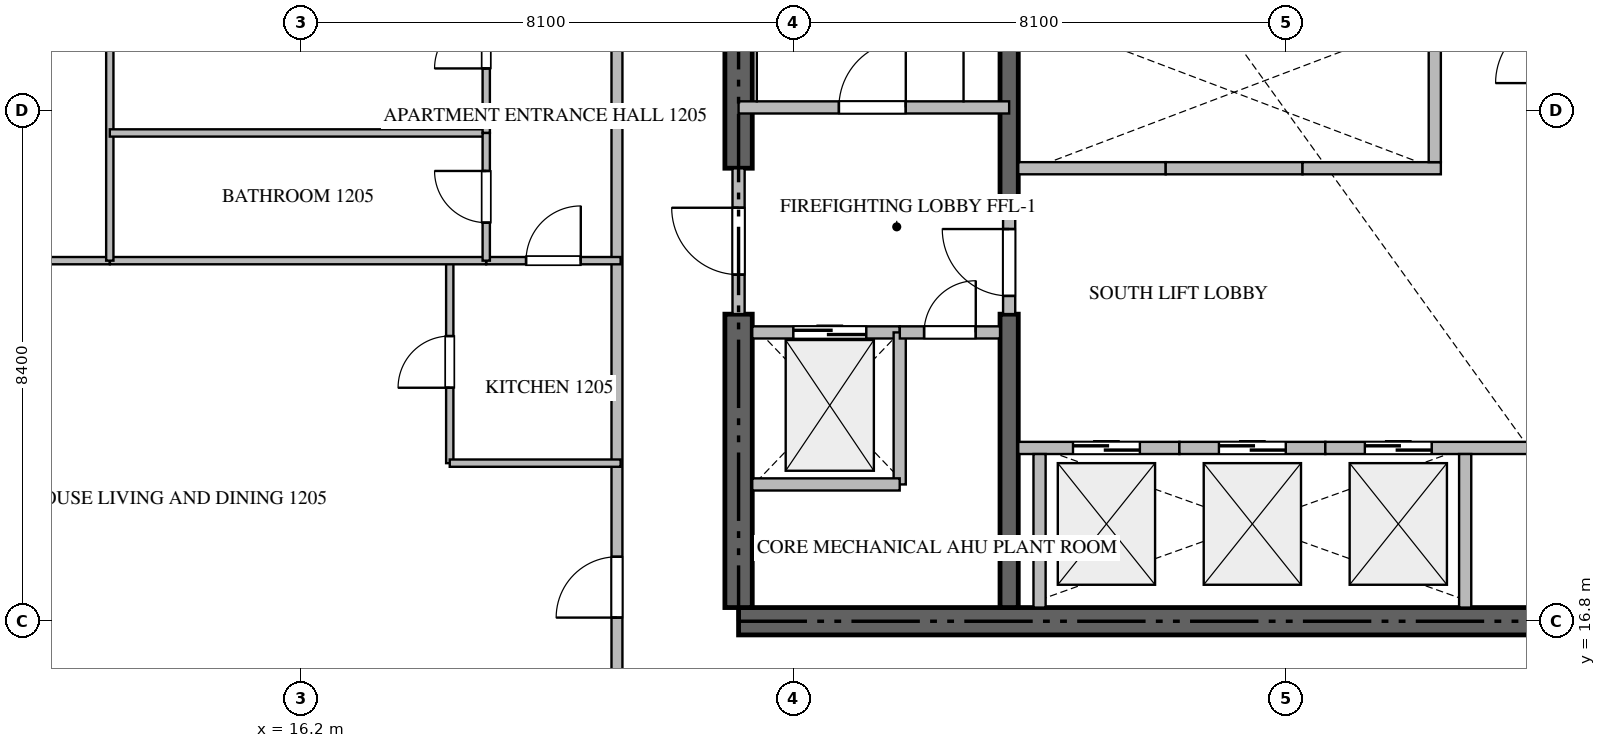
"""IFC4 building model, lengths in metres.
Left out: names, types, materials, properties, quantities, classifications, styles, units other than length and angle.
Written with IfcOpenShell. Run it as: python <this file> out.ifc"""

import sys

from ifc_helpers import new_model, si_unit, direction, frame, frame_2d, origin, place, context, subcontext, project, spatial, rectangle, extrude, source, transform, mapped, element, fill, save


model = new_model("IFC4")
c1 = context("Model", 3, precision=1e-05, world=origin(), true_north=direction((0.0, 1.0)))
c2 = subcontext(c1, "Body", "Model", "MODEL_VIEW")
j1 = project(units=[si_unit("LENGTHUNIT", "METRE"), si_unit("PLANEANGLEUNIT", "RADIAN")], contexts=[c1])
p1 = place(None, origin())
s1 = spatial("IfcSite", under=j1, at=p1, CompositionType="ELEMENT")
p2 = place(p1, origin())
s2 = spatial("IfcBuilding", under=s1, at=p2, CompositionType="ELEMENT")
p3 = place(p2, frame((0.0, 0.0, 52.95)))
s3 = spatial("IfcBuildingStorey", under=s2, at=p3, CompositionType="ELEMENT", Elevation=52.95)
p4 = place(p3, frame((23.4, 16.8, -0.26), z_axis=(0.0, 0.0, 1.0), x_axis=(1.0, 0.0, 0.0)))
e1 = element("IfcWall", 1, at=p4, inside=s3, PredefinedType="SHEAR", context=c2, shape_type="SweptSolid", body=[
    extrude(rectangle(XDim=18.0, YDim=0.45, at=frame_2d((9.0, 0.0))), origin(), (0.0, 0.0, 1.0), 3.748),
])
p5 = place(p3, frame((23.4, 17.025, -0.26), z_axis=(0.0, 0.0, 1.0), x_axis=(0.0, 1.0, 0.0)))
e2 = element("IfcWall", 2, at=p5, inside=s3, PredefinedType="SHEAR", context=c2, shape_type="SweptSolid", body=[
    extrude(rectangle(XDim=4.825, YDim=0.45, at=frame_2d((2.413, 0.0))), origin(), (0.0, 0.0, 1.0), 3.748),
])
p6 = place(p3, frame((23.4, 24.25, -0.26), z_axis=(0.0, 0.0, 1.0), x_axis=(0.0, 1.0, 0.0)))
e3 = element("IfcWall", 3, at=p6, inside=s3, PredefinedType="SHEAR", context=c2, shape_type="SweptSolid", body=[
    extrude(rectangle(XDim=9.125, YDim=0.45, at=frame_2d((4.562, 0.0))), origin(), (0.0, 0.0, 1.0), 3.748),
])
p7 = place(p3, frame((27.85, 17.025, -0.26), z_axis=(0.0, 0.0, 1.0), x_axis=(0.0, 1.0, 0.0)))
e4 = element("IfcWall", 4, at=p7, inside=s3, PredefinedType="SHEAR", context=c2, shape_type="SweptSolid", body=[
    extrude(rectangle(XDim=4.825, YDim=0.3, at=frame_2d((2.413, 0.0))), origin(), (0.0, 0.0, 1.0), 3.748),
])
p8 = place(p3, frame((27.85, 23.55, -0.26), z_axis=(0.0, 0.0, 1.0), x_axis=(0.0, 1.0, 0.0)))
e5 = element("IfcWall", 5, at=p8, inside=s3, PredefinedType="SHEAR", context=c2, shape_type="SweptSolid", body=[
    extrude(rectangle(XDim=9.825, YDim=0.3, at=frame_2d((4.913, 0.0))), origin(), (0.0, 0.0, 1.0), 3.748),
])
p9 = place(p3, frame((23.4, 25.25, 0.0), z_axis=(0.0, 0.0, 1.0), x_axis=(1.0, 0.0, 0.0)))
e6 = element("IfcWall", 6, at=p9, inside=s3, PredefinedType="STANDARD", context=c2, shape_type="SweptSolid", body=[
    extrude(rectangle(XDim=4.45, YDim=0.2, at=frame_2d((2.225, 0.0))), origin(), (0.0, 0.0, 1.0), 3.49),
])
p10 = place(p9, frame((1.65, 0.0, 0.0)))
e7 = element("IfcOpeningElement", 7, at=p10, cuts=e6, PredefinedType="OPENING", context=c2, shape_type="SweptSolid", body=[
    extrude(rectangle(XDim=1.1, YDim=2.15, at=frame_2d((0.55, 1.075))), frame((0.0, 0.11, 0.0), z_axis=(0.0, -1.0, 0.0), x_axis=(1.0, 0.0, 0.0)), (0.0, 0.0, 1.0), 0.22),
])
p11 = place(p3, frame((23.625, 21.55, 0.0), z_axis=(0.0, 0.0, 1.0), x_axis=(1.0, 0.0, 0.0)))
e8 = element("IfcWall", 8, at=p11, inside=s3, PredefinedType="STANDARD", context=c2, shape_type="SweptSolid", body=[
    extrude(rectangle(XDim=2.425, YDim=0.2, at=frame_2d((1.212, 0.0))), origin(), (0.0, 0.0, 1.0), 3.49),
])
p12 = place(p11, frame((0.675, 0.0, 0.0)))
e9 = element("IfcOpeningElement", 9, at=p12, cuts=e8, PredefinedType="OPENING", context=c2, shape_type="SweptSolid", body=[
    extrude(rectangle(XDim=1.2, YDim=2.2, at=frame_2d((0.6, 1.1))), frame((0.0, 0.11, 0.0), z_axis=(0.0, -1.0, 0.0), x_axis=(1.0, 0.0, 0.0)), (0.0, 0.0, 1.0), 0.22),
])
p13 = place(p3, frame((28.0, 19.65, 0.0), z_axis=(0.0, 0.0, 1.0), x_axis=(1.0, 0.0, 0.0)))
e10 = element("IfcWall", 10, at=p13, inside=s3, PredefinedType="STANDARD", context=c2, shape_type="SweptSolid", body=[
    extrude(rectangle(XDim=2.65, YDim=0.2, at=frame_2d((1.325, 0.0))), origin(), (0.0, 0.0, 1.0), 3.49),
])
p14 = place(p13, frame((0.9, 0.0, 0.0)))
e11 = element("IfcOpeningElement", 11, at=p14, cuts=e10, PredefinedType="OPENING", context=c2, shape_type="SweptSolid", body=[
    extrude(rectangle(XDim=1.1, YDim=2.2, at=frame_2d((0.55, 1.1))), frame((0.0, 0.11, 0.0), z_axis=(0.0, -1.0, 0.0), x_axis=(1.0, 0.0, 0.0)), (0.0, 0.0, 1.0), 0.22),
])
p15 = place(p3, frame((28.35, 17.025, 0.0), z_axis=(0.0, 0.0, 1.0), x_axis=(0.0, 1.0, 0.0)))
e12 = element("IfcWall", 12, at=p15, inside=s3, PredefinedType="STANDARD", context=c2, shape_type="SweptSolid", body=[
    extrude(rectangle(XDim=2.525, YDim=0.2, at=frame_2d((1.263, 0.0))), origin(), (0.0, 0.0, 1.0), 3.49),
])
p16 = place(p3, frame((30.65, 19.65, 0.0), z_axis=(0.0, 0.0, 1.0), x_axis=(1.0, 0.0, 0.0)))
e13 = element("IfcWall", 13, at=p16, inside=s3, PredefinedType="STANDARD", context=c2, shape_type="SweptSolid", body=[
    extrude(rectangle(XDim=2.4, YDim=0.2, at=frame_2d((1.2, 0.0))), origin(), (0.0, 0.0, 1.0), 3.49),
])
p17 = place(p16, frame((0.65, 0.0, 0.0)))
e14 = element("IfcOpeningElement", 14, at=p17, cuts=e13, PredefinedType="OPENING", context=c2, shape_type="SweptSolid", body=[
    extrude(rectangle(XDim=1.1, YDim=2.2, at=frame_2d((0.55, 1.1))), frame((0.0, 0.11, 0.0), z_axis=(0.0, -1.0, 0.0), x_axis=(1.0, 0.0, 0.0)), (0.0, 0.0, 1.0), 0.22),
])
p18 = place(p3, frame((33.05, 19.65, 0.0), z_axis=(0.0, 0.0, 1.0), x_axis=(1.0, 0.0, 0.0)))
e15 = element("IfcWall", 15, at=p18, inside=s3, PredefinedType="STANDARD", context=c2, shape_type="SweptSolid", body=[
    extrude(rectangle(XDim=3.75, YDim=0.2, at=frame_2d((1.875, 0.0))), origin(), (0.0, 0.0, 1.0), 3.49),
])
p19 = place(p18, frame((0.65, 0.0, 0.0)))
e16 = element("IfcOpeningElement", 16, at=p19, cuts=e15, PredefinedType="OPENING", context=c2, shape_type="SweptSolid", body=[
    extrude(rectangle(XDim=1.1, YDim=2.2, at=frame_2d((0.55, 1.1))), frame((0.0, 0.11, 0.0), z_axis=(0.0, -1.0, 0.0), x_axis=(1.0, 0.0, 0.0)), (0.0, 0.0, 1.0), 0.22),
])
p20 = place(p3, frame((35.35, 17.025, 0.0), z_axis=(0.0, 0.0, 1.0), x_axis=(0.0, 1.0, 0.0)))
e17 = element("IfcWall", 17, at=p20, inside=s3, PredefinedType="STANDARD", context=c2, shape_type="SweptSolid", body=[
    extrude(rectangle(XDim=2.525, YDim=0.2, at=frame_2d((1.263, 0.0))), origin(), (0.0, 0.0, 1.0), 3.49),
])
p21 = place(p3, frame((28.0, 24.25, 0.0), z_axis=(0.0, 0.0, 1.0), x_axis=(1.0, 0.0, 0.0)))
e18 = element("IfcWall", 18, at=p21, inside=s3, PredefinedType="STANDARD", context=c2, shape_type="SweptSolid", body=[
    extrude(rectangle(XDim=2.425, YDim=0.2, at=frame_2d((1.212, 0.0))), origin(), (0.0, 0.0, 1.0), 3.49),
])
p22 = place(p3, frame((30.425, 24.25, 0.0), z_axis=(0.0, 0.0, 1.0), x_axis=(1.0, 0.0, 0.0)))
e19 = element("IfcWall", 19, at=p22, inside=s3, PredefinedType="STANDARD", context=c2, shape_type="SweptSolid", body=[
    extrude(rectangle(XDim=2.25, YDim=0.2, at=frame_2d((1.125, 0.0))), origin(), (0.0, 0.0, 1.0), 3.49),
])
p23 = place(p3, frame((32.675, 24.25, 0.0), z_axis=(0.0, 0.0, 1.0), x_axis=(1.0, 0.0, 0.0)))
e20 = element("IfcWall", 20, at=p23, inside=s3, PredefinedType="STANDARD", context=c2, shape_type="SweptSolid", body=[
    extrude(rectangle(XDim=2.275, YDim=0.2, at=frame_2d((1.137, 0.0))), origin(), (0.0, 0.0, 1.0), 3.49),
])
for number, where, z_axis, x_axis in (
    (21, (34.85, 24.35, 0.0), (0.0, 0.0, 1.0), (0.0, 1.0, 0.0)),
    (22, (26.05, 19.05, 0.0), (0.0, 0.0, 1.0), (0.0, 1.0, 0.0)),
):
    element("IfcWall", number, at=place(p3, frame(where, z_axis=z_axis, x_axis=x_axis)), inside=s3, PredefinedType="STANDARD", context=c2, shape_type="SweptSolid", body=[
        extrude(rectangle(XDim=2.5, YDim=0.2, at=frame_2d((1.25, 0.0))), origin(), (0.0, 0.0, 1.0), 3.49),
    ])
p24 = place(p3, frame((23.625, 19.05, 0.0), z_axis=(0.0, 0.0, 1.0), x_axis=(1.0, 0.0, 0.0)))
e23 = element("IfcWall", 23, at=p24, inside=s3, PredefinedType="STANDARD", context=c2, shape_type="SweptSolid", body=[
    extrude(rectangle(XDim=2.425, YDim=0.2, at=frame_2d((1.212, 0.0))), origin(), (0.0, 0.0, 1.0), 3.49),
])
p25 = place(p3, frame((26.052, 21.55, 0.0), z_axis=(0.0, 0.0, 1.0), x_axis=(1.0, 0.0, 0.0)))
e24 = element("IfcWall", 24, at=p25, inside=s3, PredefinedType="STANDARD", context=c2, shape_type="SweptSolid", body=[
    extrude(rectangle(XDim=1.648, YDim=0.2, at=frame_2d((0.824, 0.0))), origin(), (0.0, 0.0, 1.0), 3.49),
])
p26 = place(p25, frame((0.399, 0.0, 0.0)))
e25 = element("IfcOpeningElement", 25, at=p26, cuts=e24, PredefinedType="OPENING", context=c2, shape_type="SweptSolid", body=[
    extrude(rectangle(XDim=0.85, YDim=2.1, at=frame_2d((0.425, 1.05))), frame((0.0, 0.11, 0.0), z_axis=(0.0, -1.0, 0.0), x_axis=(1.0, 0.0, 0.0)), (0.0, 0.0, 1.0), 0.22),
])
p27 = place(p3, frame((23.4, 21.852, 0.0), z_axis=(0.0, 0.0, 1.0), x_axis=(0.0, 1.0, 0.0)))
e26 = element("IfcWall", 26, at=p27, inside=s3, PredefinedType="STANDARD", context=c2, shape_type="SweptSolid", body=[
    extrude(rectangle(XDim=2.396, YDim=0.2, at=frame_2d((1.198, 0.0))), origin(), (0.0, 0.0, 1.0), 3.49),
])
p28 = place(p27, frame((0.648, 0.0, 0.0)))
e27 = element("IfcOpeningElement", 27, at=p28, cuts=e26, PredefinedType="OPENING", context=c2, shape_type="SweptSolid", body=[
    extrude(rectangle(XDim=1.1, YDim=2.15, at=frame_2d((0.55, 1.075))), frame((0.0, 0.11, 0.0), z_axis=(0.0, -1.0, 0.0), x_axis=(1.0, 0.0, 0.0)), (0.0, 0.0, 1.0), 0.22),
])
p29 = place(p3, frame((27.85, 21.852, 0.0), z_axis=(0.0, 0.0, 1.0), x_axis=(0.0, 1.0, 0.0)))
e28 = element("IfcWall", 28, at=p29, inside=s3, PredefinedType="STANDARD", context=c2, shape_type="SweptSolid", body=[
    extrude(rectangle(XDim=1.696, YDim=0.2, at=frame_2d((0.848, 0.0))), origin(), (0.0, 0.0, 1.0), 3.49),
])
p30 = place(p29, frame((0.298, 0.0, 0.0)))
e29 = element("IfcOpeningElement", 29, at=p30, cuts=e28, PredefinedType="OPENING", context=c2, shape_type="SweptSolid", body=[
    extrude(rectangle(XDim=1.1, YDim=2.15, at=frame_2d((0.55, 1.075))), frame((0.0, 0.11, 0.0), z_axis=(0.0, -1.0, 0.0), x_axis=(1.0, 0.0, 0.0)), (0.0, 0.0, 1.0), 0.22),
])
p31 = place(p3, frame((21.4, 14.9, 0.0), z_axis=(0.0, 0.0, 1.0), x_axis=(0.0, 1.0, 0.0)))
e30 = element("IfcWall", 30, at=p31, inside=s3, PredefinedType="PARTITIONING", context=c2, shape_type="SweptSolid", body=[
    extrude(rectangle(XDim=20.6, YDim=0.18, at=frame_2d((10.3, 0.0))), origin(), (0.0, 0.0, 1.0), 3.49),
])
p32 = place(p31, frame((1.96, 0.0, 0.0)))
e31 = element("IfcOpeningElement", 31, at=p32, cuts=e30, PredefinedType="OPENING", context=c2, shape_type="SweptSolid", body=[
    extrude(rectangle(XDim=1.0, YDim=2.15, at=frame_2d((0.5, 1.075))), frame((0.0, 0.1, 0.0), z_axis=(0.0, -1.0, 0.0), x_axis=(1.0, 0.0, 0.0)), (0.0, 0.0, 1.0), 0.2),
])
p33 = place(p3, frame((18.65, 19.4, 0.0), z_axis=(0.0, 0.0, 1.0), x_axis=(0.0, 1.0, 0.0)))
e32 = element("IfcWall", 32, at=p33, inside=s3, PredefinedType="PARTITIONING", context=c2, shape_type="SweptSolid", body=[
    extrude(rectangle(XDim=3.33, YDim=0.12, at=frame_2d((1.665, 0.0))), origin(), (0.0, 0.0, 1.0), 3.49),
])
p34 = place(p33, frame((1.24, 0.0, 0.0)))
e33 = element("IfcOpeningElement", 33, at=p34, cuts=e32, PredefinedType="OPENING", context=c2, shape_type="SweptSolid", body=[
    extrude(rectangle(XDim=0.85, YDim=2.1, at=frame_2d((0.425, 1.05))), frame((0.0, 0.07, 0.0), z_axis=(0.0, -1.0, 0.0), x_axis=(1.0, 0.0, 0.0)), (0.0, 0.0, 1.0), 0.14),
])
p35 = place(p3, frame((18.65, 19.4, 0.0), z_axis=(0.0, 0.0, 1.0), x_axis=(1.0, 0.0, 0.0)))
e34 = element("IfcWall", 34, at=p35, inside=s3, PredefinedType="PARTITIONING", context=c2, shape_type="SweptSolid", body=[
    extrude(rectangle(XDim=2.81, YDim=0.12, at=frame_2d((1.405, 0.0))), origin(), (0.0, 0.0, 1.0), 3.49),
])
p36 = place(p3, frame((19.25, 22.73, 0.0), z_axis=(0.0, 0.0, 1.0), x_axis=(1.0, 0.0, 0.0)))
e35 = element("IfcWall", 35, at=p36, inside=s3, PredefinedType="PARTITIONING", context=c2, shape_type="SweptSolid", body=[
    extrude(rectangle(XDim=2.21, YDim=0.12, at=frame_2d((1.105, 0.0))), origin(), (0.0, 0.0, 1.0), 3.49),
])
p37 = place(p36, frame((0.655, 0.0, 0.0)))
e36 = element("IfcOpeningElement", 36, at=p37, cuts=e35, PredefinedType="OPENING", context=c2, shape_type="SweptSolid", body=[
    extrude(rectangle(XDim=0.9, YDim=2.1, at=frame_2d((0.45, 1.05))), frame((0.0, 0.07, 0.0), z_axis=(0.0, -1.0, 0.0), x_axis=(1.0, 0.0, 0.0)), (0.0, 0.0, 1.0), 0.14),
])
p38 = place(p3, frame((6.095, 22.73, 0.0), z_axis=(0.0, 0.0, 1.0), x_axis=(1.0, 0.0, 0.0)))
e37 = element("IfcWall", 37, at=p38, inside=s3, PredefinedType="PARTITIONING", context=c2, shape_type="SweptSolid", body=[
    extrude(rectangle(XDim=6.964, YDim=0.12, at=frame_2d((3.482, 0.0))), origin(), (0.0, 0.0, 1.0), 3.49),
])
p39 = place(p38, frame((3.335, 0.0, 0.0)))
e38 = element("IfcOpeningElement", 38, at=p39, cuts=e37, PredefinedType="OPENING", context=c2, shape_type="SweptSolid", body=[
    extrude(rectangle(XDim=0.9, YDim=2.1, at=frame_2d((0.45, 1.05))), frame((0.0, 0.07, 0.0), z_axis=(0.0, -1.0, 0.0), x_axis=(1.0, 0.0, 0.0)), (0.0, 0.0, 1.0), 0.14),
])
p40 = place(p3, frame((13.061, 22.73, 0.0), z_axis=(0.0, 0.0, 1.0), x_axis=(1.0, 0.0, 0.0)))
e39 = element("IfcWall", 39, at=p40, inside=s3, PredefinedType="PARTITIONING", context=c2, shape_type="SweptSolid", body=[
    extrude(rectangle(XDim=6.187, YDim=0.12, at=frame_2d((3.094, 0.0))), origin(), (0.0, 0.0, 1.0), 3.49),
])
p41 = place(p3, frame((13.059, 22.73, 0.0), z_axis=(0.0, 0.0, 1.0), x_axis=(0.0, 1.0, 0.0)))
e40 = element("IfcWall", 40, at=p41, inside=s3, PredefinedType="PARTITIONING", context=c2, shape_type="SweptSolid", body=[
    extrude(rectangle(XDim=5.07, YDim=0.12, at=frame_2d((2.535, 0.0))), origin(), (0.0, 0.0, 1.0), 3.49),
])
p42 = place(p3, frame((13.059, 24.83, 0.0), z_axis=(0.0, 0.0, 1.0), x_axis=(1.0, 0.0, 0.0)))
e41 = element("IfcWall", 41, at=p42, inside=s3, PredefinedType="PARTITIONING", context=c2, shape_type="SweptSolid", body=[
    extrude(rectangle(XDim=6.191, YDim=0.12, at=frame_2d((3.095, 0.0))), origin(), (0.0, 0.0, 1.0), 3.49),
])
p43 = place(p3, frame((19.25, 22.73, 0.0), z_axis=(0.0, 0.0, 1.0), x_axis=(0.0, 1.0, 0.0)))
e42 = element("IfcWall", 42, at=p43, inside=s3, PredefinedType="PARTITIONING", context=c2, shape_type="SweptSolid", body=[
    extrude(rectangle(XDim=2.1, YDim=0.12, at=frame_2d((1.05, 0.0))), origin(), (0.0, 0.0, 1.0), 3.49),
])
p44 = place(p43, frame((0.625, 0.0, 0.0)))
e43 = element("IfcOpeningElement", 43, at=p44, cuts=e42, PredefinedType="OPENING", context=c2, shape_type="SweptSolid", body=[
    extrude(rectangle(XDim=0.85, YDim=2.1, at=frame_2d((0.425, 1.05))), frame((0.0, 0.07, 0.0), z_axis=(0.0, -1.0, 0.0), x_axis=(1.0, 0.0, 0.0)), (0.0, 0.0, 1.0), 0.14),
])
p45 = place(p3, frame((19.25, 24.832, 0.0), z_axis=(0.0, 0.0, 1.0), x_axis=(0.0, 1.0, 0.0)))
e44 = element("IfcWall", 44, at=p45, inside=s3, PredefinedType="PARTITIONING", context=c2, shape_type="SweptSolid", body=[
    extrude(rectangle(XDim=2.968, YDim=0.12, at=frame_2d((1.484, 0.0))), origin(), (0.0, 0.0, 1.0), 3.49),
])
p46 = place(p45, frame((1.059, 0.0, 0.0)))
e45 = element("IfcOpeningElement", 45, at=p46, cuts=e44, PredefinedType="OPENING", context=c2, shape_type="SweptSolid", body=[
    extrude(rectangle(XDim=0.85, YDim=2.1, at=frame_2d((0.425, 1.05))), frame((0.0, 0.07, 0.0), z_axis=(0.0, -1.0, 0.0), x_axis=(1.0, 0.0, 0.0)), (0.0, 0.0, 1.0), 0.14),
])
m1 = source(origin(), c2, "Body", "SweptSolid", [
    extrude(rectangle(XDim=1.1, YDim=2.15, at=frame_2d((0.55, 1.075))), frame((0.0, 0.025, 0.0), z_axis=(0.0, -1.0, 0.0), x_axis=(1.0, 0.0, 0.0)), (0.0, 0.0, 1.0), 0.05),
])
p47 = place(p10, origin())
e46 = element("IfcDoor", 46, at=p47, inside=s3, OperationType="SINGLE_SWING_RIGHT", PredefinedType="DOOR", context=c2, shape_type="MappedRepresentation", body=[
    mapped(m1, transform((0.0, 0.0, 0.0), scale=1.0)),
])
fill(e7, e46)
m2 = source(origin(), c2, "Body", "SweptSolid", [
    extrude(rectangle(XDim=1.2, YDim=2.2, at=frame_2d((0.6, 1.1))), frame((0.0, 0.025, 0.0), z_axis=(0.0, -1.0, 0.0), x_axis=(1.0, 0.0, 0.0)), (0.0, 0.0, 1.0), 0.05),
])
p48 = place(p12, origin())
e47 = element("IfcDoor", 47, at=p48, inside=s3, OperationType="DOUBLE_DOOR_SLIDING", PredefinedType="DOOR", context=c2, shape_type="MappedRepresentation", body=[
    mapped(m2, transform((0.0, 0.0, 0.0), scale=1.0)),
])
fill(e9, e47)
m3 = source(origin(), c2, "Body", "SweptSolid", [
    extrude(rectangle(XDim=1.1, YDim=2.2, at=frame_2d((0.55, 1.1))), frame((0.0, 0.025, 0.0), z_axis=(0.0, -1.0, 0.0), x_axis=(1.0, 0.0, 0.0)), (0.0, 0.0, 1.0), 0.05),
])
p49 = place(p14, origin())
e48 = element("IfcDoor", 48, at=p49, inside=s3, OperationType="DOUBLE_DOOR_SLIDING", PredefinedType="DOOR", context=c2, shape_type="MappedRepresentation", body=[
    mapped(m3, transform((0.0, 0.0, 0.0), scale=1.0)),
])
fill(e11, e48)
p50 = place(p17, origin())
e49 = element("IfcDoor", 49, at=p50, inside=s3, OperationType="DOUBLE_DOOR_SLIDING", PredefinedType="DOOR", context=c2, shape_type="MappedRepresentation", body=[
    mapped(m3, transform((0.0, 0.0, 0.0), scale=1.0)),
])
fill(e14, e49)
p51 = place(p19, origin())
e50 = element("IfcDoor", 50, at=p51, inside=s3, OperationType="DOUBLE_DOOR_SLIDING", PredefinedType="DOOR", context=c2, shape_type="MappedRepresentation", body=[
    mapped(m3, transform((0.0, 0.0, 0.0), scale=1.0)),
])
fill(e16, e50)
m4 = source(origin(), c2, "Body", "SweptSolid", [
    extrude(rectangle(XDim=0.85, YDim=2.1, at=frame_2d((0.425, 1.05))), frame((0.0, 0.025, 0.0), z_axis=(0.0, -1.0, 0.0), x_axis=(1.0, 0.0, 0.0)), (0.0, 0.0, 1.0), 0.05),
])
p52 = place(p26, origin())
e51 = element("IfcDoor", 51, at=p52, inside=s3, OperationType="SINGLE_SWING_RIGHT", PredefinedType="DOOR", context=c2, shape_type="MappedRepresentation", body=[
    mapped(m4, transform((0.0, 0.0, 0.0), scale=1.0)),
])
fill(e25, e51)
p53 = place(p28, origin())
e52 = element("IfcDoor", 52, at=p53, inside=s3, OperationType="SINGLE_SWING_RIGHT", PredefinedType="DOOR", context=c2, shape_type="MappedRepresentation", body=[
    mapped(m1, transform((0.0, 0.0, 0.0), scale=1.0)),
])
fill(e27, e52)
p54 = place(p30, origin())
e53 = element("IfcDoor", 53, at=p54, inside=s3, OperationType="SINGLE_SWING_RIGHT", PredefinedType="DOOR", context=c2, shape_type="MappedRepresentation", body=[
    mapped(m1, transform((0.0, 0.0, 0.0), scale=1.0)),
])
fill(e29, e53)
m5 = source(origin(), c2, "Body", "SweptSolid", [
    extrude(rectangle(XDim=1.0, YDim=2.15, at=frame_2d((0.5, 1.075))), frame((0.0, 0.025, 0.0), z_axis=(0.0, -1.0, 0.0), x_axis=(1.0, 0.0, 0.0)), (0.0, 0.0, 1.0), 0.05),
])
p55 = place(p32, origin())
e54 = element("IfcDoor", 54, at=p55, inside=s3, OperationType="SINGLE_SWING_LEFT", PredefinedType="DOOR", context=c2, shape_type="MappedRepresentation", body=[
    mapped(m5, transform((0.0, 0.0, 0.0), scale=1.0)),
])
fill(e31, e54)
p56 = place(p34, origin())
e55 = element("IfcDoor", 55, at=p56, inside=s3, OperationType="SINGLE_SWING_LEFT", PredefinedType="DOOR", context=c2, shape_type="MappedRepresentation", body=[
    mapped(m4, transform((0.0, 0.0, 0.0), scale=1.0)),
])
fill(e33, e55)
m6 = source(origin(), c2, "Body", "SweptSolid", [
    extrude(rectangle(XDim=0.9, YDim=2.1, at=frame_2d((0.45, 1.05))), frame((0.0, 0.025, 0.0), z_axis=(0.0, -1.0, 0.0), x_axis=(1.0, 0.0, 0.0)), (0.0, 0.0, 1.0), 0.05),
])
p57 = place(p37, origin())
e56 = element("IfcDoor", 56, at=p57, inside=s3, OperationType="SINGLE_SWING_RIGHT", PredefinedType="DOOR", context=c2, shape_type="MappedRepresentation", body=[
    mapped(m6, transform((0.0, 0.0, 0.0), scale=1.0)),
])
fill(e36, e56)
p58 = place(p44, origin())
e57 = element("IfcDoor", 57, at=p58, inside=s3, OperationType="SINGLE_SWING_RIGHT", PredefinedType="DOOR", context=c2, shape_type="MappedRepresentation", body=[
    mapped(m4, transform((0.0, 0.0, 0.0), scale=1.0)),
])
fill(e43, e57)
p59 = place(p46, origin())
e58 = element("IfcDoor", 58, at=p59, inside=s3, OperationType="SINGLE_SWING_LEFT", PredefinedType="DOOR", context=c2, shape_type="MappedRepresentation", body=[
    mapped(m4, transform((0.0, 0.0, 0.0), scale=1.0)),
])
fill(e45, e58)
save(model, sys.argv[1])
